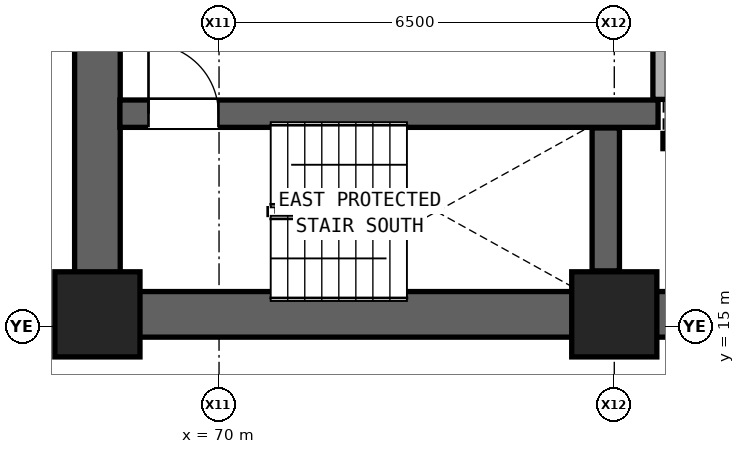
"""IFC4 building model, lengths in metres.
Left out: names, types, materials, properties, quantities, classifications, styles, units other than length and angle.
Written with IfcOpenShell. Run it as: python <this file> out.ifc"""

import sys

from ifc_helpers import new_model, si_unit, direction, frame, frame_2d, origin, origin_2d, place, context, subcontext, project, spatial, rectangle, extrude, element, fill, save


model = new_model("IFC4")
c1 = context("Model", 3, precision=1e-05, world=origin(), true_north=direction((0.0, 1.0)))
c2 = subcontext(c1, "Body", "Model", "MODEL_VIEW")
j1 = project(units=[si_unit("LENGTHUNIT", "METRE"), si_unit("PLANEANGLEUNIT", "RADIAN")], contexts=[c1])
p1 = place(None, origin())
s1 = spatial("IfcSite", under=j1, at=p1, CompositionType="ELEMENT")
p2 = place(p1, origin())
s2 = spatial("IfcBuilding", under=s1, at=p2, CompositionType="ELEMENT")
p3 = place(p2, frame((0.0, 0.0, 35.6)))
s3 = spatial("IfcBuildingStorey", under=s2, at=p3, CompositionType="ELEMENT", Elevation=35.6)
for number, where, z_axis, x_axis in (
    (1, (68.0, 15.2, 0.0), (0.0, 0.0, 1.0), (1.0, 0.0, 0.0)),
    (2, (76.5, 15.2, 0.0), (0.0, 0.0, 1.0), (1.0, 0.0, 0.0)),
):
    element("IfcColumn", number, at=place(p3, frame(where, z_axis=z_axis, x_axis=x_axis)), inside=s3, PredefinedType="COLUMN", context=c2, shape_type="SweptSolid", body=[
        extrude(rectangle(XDim=1.4, YDim=1.4, at=origin_2d()), origin(), (0.0, 0.0, 1.0), 3.3),
    ])
p4 = place(p3, frame((68.0, 15.2, 0.0), z_axis=(0.0, 0.0, 1.0), x_axis=(1.0, 0.0, 0.0)))
e3 = element("IfcWall", 3, at=p4, inside=s3, PredefinedType="SHEAR", context=c2, shape_type="SweptSolid", body=[
    extrude(rectangle(XDim=17.0, YDim=0.75, at=frame_2d((8.5, 0.0))), origin(), (0.0, 0.0, 1.0), 3.06),
])
p5 = place(p3, frame((68.0, 15.2, 0.0), z_axis=(0.0, 0.0, 1.0), x_axis=(0.0, 1.0, 0.0)))
e4 = element("IfcWall", 4, at=p5, inside=s3, PredefinedType="SHEAR", context=c2, shape_type="SweptSolid", body=[
    extrude(rectangle(XDim=5.6, YDim=0.75, at=frame_2d((2.8, 0.0))), origin(), (0.0, 0.0, 1.0), 3.06),
])
p6 = place(p3, frame((77.3, 18.05, 0.0), z_axis=(0.0, 0.0, 1.0), x_axis=(1.0, 0.0, 0.0)))
e5 = element("IfcWall", 5, at=p6, inside=s3, PredefinedType="SOLIDWALL", context=c2, shape_type="SweptSolid", body=[
    extrude(rectangle(XDim=4.35, YDim=0.25, at=frame_2d((2.175, 0.0))), origin(), (0.0, 0.0, 1.0), 3.06),
])
p7 = place(p3, frame((68.37, 18.5, 0.0), z_axis=(0.0, 0.0, 1.0), x_axis=(1.0, 0.0, 0.0)))
e6 = element("IfcWall", 6, at=p7, inside=s3, PredefinedType="SHEAR", context=c2, shape_type="SweptSolid", body=[
    extrude(rectangle(XDim=8.85, YDim=0.45, at=frame_2d((4.425, 0.0))), origin(), (0.0, 0.0, 1.0), 3.06),
])
p8 = place(p7, frame((0.47, 0.0, 0.0)))
e7 = element("IfcOpeningElement", 7, at=p8, cuts=e6, PredefinedType="OPENING", context=c2, shape_type="SweptSolid", body=[
    extrude(rectangle(XDim=1.15, YDim=2.2, at=frame_2d((0.575, 1.1))), frame((0.0, 0.235, 0.0), z_axis=(0.0, -1.0, 0.0), x_axis=(1.0, 0.0, 0.0)), (0.0, 0.0, 1.0), 0.47),
])
p9 = place(p3, frame((76.36, 15.915, 0.0), z_axis=(0.0, 0.0, 1.0), x_axis=(0.0, 1.0, 0.0)))
e8 = element("IfcWall", 8, at=p9, inside=s3, PredefinedType="SHEAR", context=c2, shape_type="SweptSolid", body=[
    extrude(rectangle(XDim=2.35, YDim=0.45, at=frame_2d((1.175, 0.0))), origin(), (0.0, 0.0, 1.0), 3.06),
])
p10 = place(p3, frame((77.26, 18.735, 0.0), z_axis=(0.0, 0.0, 1.0), x_axis=(0.0, 1.0, 0.0)))
e9 = element("IfcWall", 9, at=p10, inside=s3, PredefinedType="SOLIDWALL", context=c2, shape_type="SweptSolid", body=[
    extrude(rectangle(XDim=1.695, YDim=0.25, at=frame_2d((0.847, 0.0))), origin(), (0.0, 0.0, 1.0), 3.06),
])
p11 = place(p8, origin())
e10 = element("IfcDoor", 10, at=p11, inside=s3, OperationType="SINGLE_SWING_LEFT", PredefinedType="DOOR", context=c2, shape_type="SweptSolid", body=[
    extrude(rectangle(XDim=1.15, YDim=2.2, at=frame_2d((0.575, 1.1))), frame((0.0, 0.025, 0.0), z_axis=(0.0, -1.0, 0.0), x_axis=(1.0, 0.0, 0.0)), (0.0, 0.0, 1.0), 0.05),
])
fill(e7, e10)
save(model, sys.argv[1])
